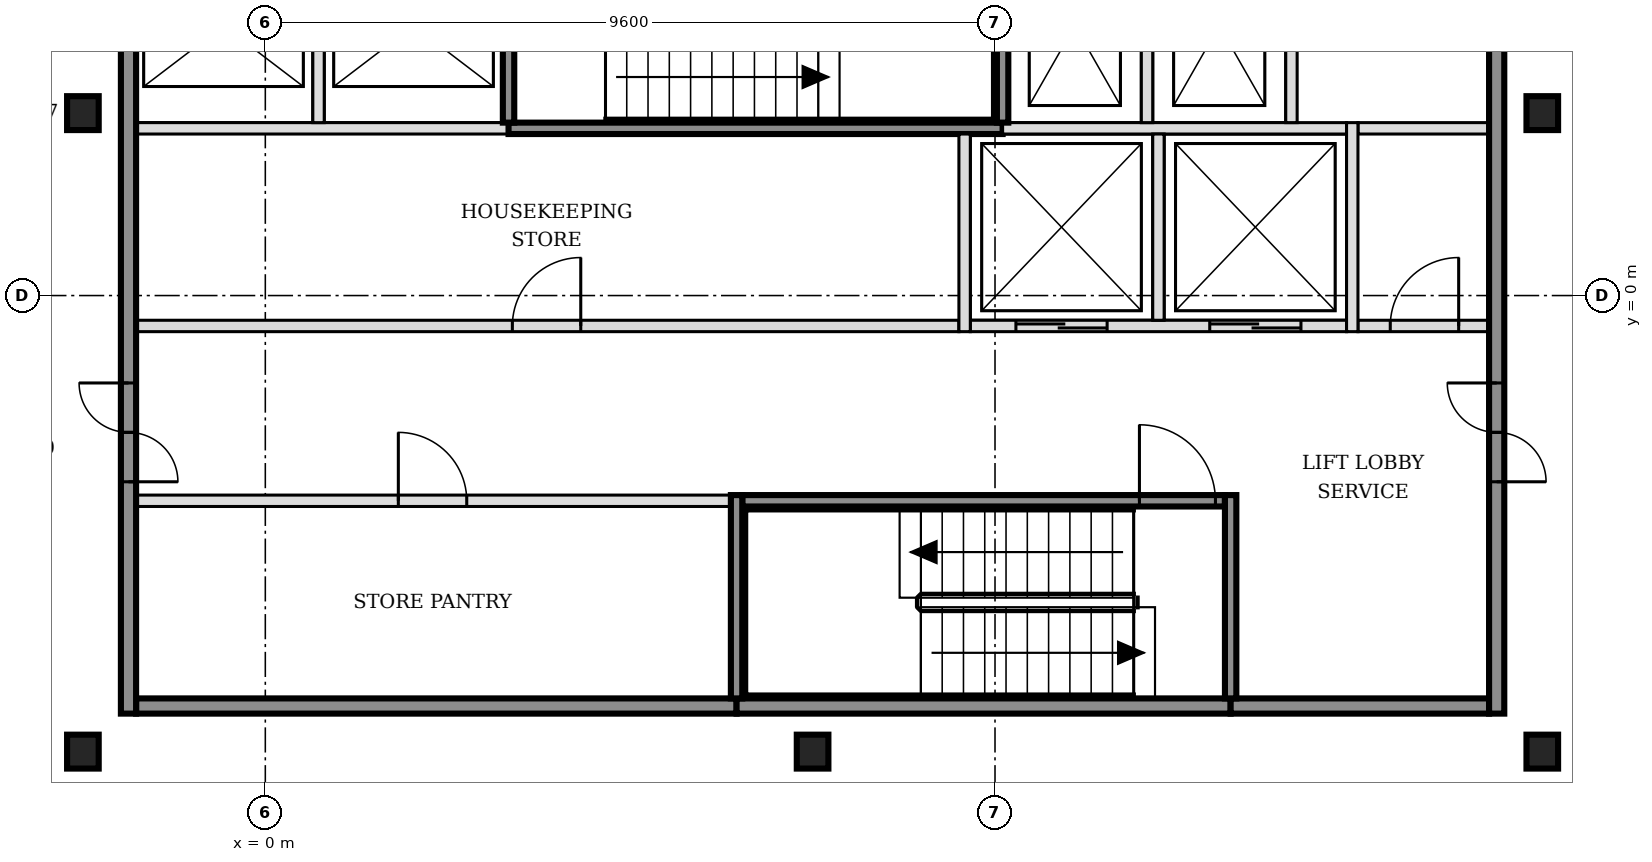
"""IFC4 building model, lengths in metres.
Left out: names, types, materials, properties, quantities, classifications, styles, units other than length and angle.
Written with IfcOpenShell. Run it as: python <this file> out.ifc"""

import sys

from ifc_helpers import new_model, si_unit, direction, frame, frame_2d, origin, origin_2d, place, context, subcontext, project, spatial, rectangle, i_section, extrude, element, fill, save


model = new_model("IFC4")
c1 = context("Model", 3, precision=1e-05, world=origin(), true_north=direction((0.0, 1.0)))
c2 = subcontext(c1, "Body", "Model", "MODEL_VIEW")
j1 = project(units=[si_unit("LENGTHUNIT", "METRE"), si_unit("PLANEANGLEUNIT", "RADIAN")], contexts=[c1])
p1 = place(None, origin())
s1 = spatial("IfcSite", under=j1, at=p1, CompositionType="ELEMENT")
p2 = place(p1, origin())
s2 = spatial("IfcBuilding", under=s1, at=p2, CompositionType="ELEMENT")
p3 = place(p2, frame((0.0, 0.0, 161.4)))
s3 = spatial("IfcBuildingStorey", under=s2, at=p3, CompositionType="ELEMENT", Elevation=161.4)
for number, where, z_axis, x_axis in (
    (1, (-2.4, -6.0, -0.15), (0.0, 0.0, 1.0), (1.0, 0.0, 0.0)),
    (2, (7.2, -6.0, -0.15), (0.0, 0.0, 1.0), (1.0, 0.0, 0.0)),
    (3, (16.8, -6.0, -0.15), (0.0, 0.0, 1.0), (1.0, 0.0, 0.0)),
    (4, (-2.4, 2.4, -0.15), (0.0, 0.0, 1.0), (1.0, 0.0, 0.0)),
    (5, (16.8, 2.4, -0.15), (0.0, 0.0, 1.0), (1.0, 0.0, 0.0)),
):
    element("IfcColumn", number, at=place(p3, frame(where, z_axis=z_axis, x_axis=x_axis)), inside=s3, PredefinedType="COLUMN", context=c2, shape_type="SweptSolid", body=[
        extrude(i_section(OverallWidth=0.416, OverallDepth=0.446, WebThickness=0.039, FlangeThickness=0.063, FilletRadius=0.015, at=origin_2d()), origin(), (0.0, 0.0, 1.0), 3.6),
    ])
p4 = place(p3, frame((-1.7, -5.4, 0.0), z_axis=(0.0, 0.0, 1.0), x_axis=(1.0, 0.0, 0.0)))
e6 = element("IfcWall", 6, at=p4, inside=s3, PredefinedType="SOLIDWALL", context=c2, shape_type="SweptSolid", body=[
    extrude(rectangle(XDim=7.9, YDim=0.2, at=frame_2d((3.95, 0.0))), origin(), (0.0, 0.0, 1.0), 3.45),
])
p5 = place(p3, frame((6.2, -5.4, 0.0), z_axis=(0.0, 0.0, 1.0), x_axis=(1.0, 0.0, 0.0)))
e7 = element("IfcWall", 7, at=p5, inside=s3, PredefinedType="SOLIDWALL", context=c2, shape_type="SweptSolid", body=[
    extrude(rectangle(XDim=6.5, YDim=0.2, at=frame_2d((3.25, 0.0))), origin(), (0.0, 0.0, 1.0), 3.45),
])
p6 = place(p3, frame((12.7, -5.4, 0.0), z_axis=(0.0, 0.0, 1.0), x_axis=(1.0, 0.0, 0.0)))
e8 = element("IfcWall", 8, at=p6, inside=s3, PredefinedType="SOLIDWALL", context=c2, shape_type="SweptSolid", body=[
    extrude(rectangle(XDim=3.4, YDim=0.2, at=frame_2d((1.7, 0.0))), origin(), (0.0, 0.0, 1.0), 3.45),
])
p7 = place(p3, frame((-1.7, -2.7, 0.0), z_axis=(0.0, 0.0, 1.0), x_axis=(1.0, 0.0, 0.0)))
e9 = element("IfcWall", 9, at=p7, inside=s3, PredefinedType="PARTITIONING", context=c2, shape_type="SweptSolid", body=[
    extrude(rectangle(XDim=7.825, YDim=0.15, at=frame_2d((3.913, 0.0))), origin(), (0.0, 0.0, 1.0), 3.45),
])
p8 = place(p7, frame((3.45, 0.0, 0.0)))
e10 = element("IfcOpeningElement", 10, at=p8, cuts=e9, PredefinedType="OPENING", context=c2, shape_type="SweptSolid", body=[
    extrude(rectangle(XDim=0.9, YDim=2.1, at=frame_2d((0.45, 1.05))), frame((0.0, 0.085, 0.0), z_axis=(0.0, -1.0, 0.0), x_axis=(1.0, 0.0, 0.0)), (0.0, 0.0, 1.0), 0.17),
])
p9 = place(p3, frame((6.275, -2.7, 0.0), z_axis=(0.0, 0.0, 1.0), x_axis=(1.0, 0.0, 0.0)))
e11 = element("IfcWall", 11, at=p9, inside=s3, PredefinedType="SOLIDWALL", context=c2, shape_type="SweptSolid", body=[
    extrude(rectangle(XDim=6.35, YDim=0.15, at=frame_2d((3.175, 0.0))), origin(), (0.0, 0.0, 1.0), 3.45),
])
p10 = place(p9, frame((5.225, 0.0, 0.0)))
e12 = element("IfcOpeningElement", 12, at=p10, cuts=e11, PredefinedType="OPENING", context=c2, shape_type="SweptSolid", body=[
    extrude(rectangle(XDim=1.0, YDim=2.1, at=frame_2d((0.5, 1.05))), frame((0.0, 0.085, 0.0), z_axis=(0.0, -1.0, 0.0), x_axis=(1.0, 0.0, 0.0)), (0.0, 0.0, 1.0), 0.17),
])
p11 = place(p3, frame((-1.7, -0.4, 0.0), z_axis=(0.0, 0.0, 1.0), x_axis=(1.0, 0.0, 0.0)))
e13 = element("IfcWall", 13, at=p11, inside=s3, PredefinedType="PARTITIONING", context=c2, shape_type="SweptSolid", body=[
    extrude(rectangle(XDim=10.825, YDim=0.15, at=frame_2d((5.413, 0.0))), origin(), (0.0, 0.0, 1.0), 3.45),
])
p12 = place(p11, frame((4.95, 0.0, 0.0)))
e14 = element("IfcOpeningElement", 14, at=p12, cuts=e13, PredefinedType="OPENING", context=c2, shape_type="SweptSolid", body=[
    extrude(rectangle(XDim=0.9, YDim=2.1, at=frame_2d((0.45, 1.05))), frame((0.0, 0.085, 0.0), z_axis=(0.0, -1.0, 0.0), x_axis=(1.0, 0.0, 0.0)), (0.0, 0.0, 1.0), 0.17),
])
p13 = place(p3, frame((9.275, -0.4, 0.0), z_axis=(0.0, 0.0, 1.0), x_axis=(1.0, 0.0, 0.0)))
e15 = element("IfcWall", 15, at=p13, inside=s3, PredefinedType="SOLIDWALL", context=c2, shape_type="SweptSolid", body=[
    extrude(rectangle(XDim=4.95, YDim=0.15, at=frame_2d((2.475, 0.0))), origin(), (0.0, 0.0, 1.0), 3.45),
])
p14 = place(p13, frame((0.6, 0.0, 0.0)))
e16 = element("IfcOpeningElement", 16, at=p14, cuts=e15, PredefinedType="OPENING", context=c2, shape_type="SweptSolid", body=[
    extrude(rectangle(XDim=1.2, YDim=2.1, at=frame_2d((0.6, 1.05))), frame((0.0, 0.085, 0.0), z_axis=(0.0, -1.0, 0.0), x_axis=(1.0, 0.0, 0.0)), (0.0, 0.0, 1.0), 0.17),
])
p15 = place(p13, frame((3.15, 0.0, 0.0)))
e17 = element("IfcOpeningElement", 17, at=p15, cuts=e15, PredefinedType="OPENING", context=c2, shape_type="SweptSolid", body=[
    extrude(rectangle(XDim=1.2, YDim=2.1, at=frame_2d((0.6, 1.05))), frame((0.0, 0.085, 0.0), z_axis=(0.0, -1.0, 0.0), x_axis=(1.0, 0.0, 0.0)), (0.0, 0.0, 1.0), 0.17),
])
p16 = place(p3, frame((14.375, -0.4, 0.0), z_axis=(0.0, 0.0, 1.0), x_axis=(1.0, 0.0, 0.0)))
e18 = element("IfcWall", 18, at=p16, inside=s3, PredefinedType="PARTITIONING", context=c2, shape_type="SweptSolid", body=[
    extrude(rectangle(XDim=1.725, YDim=0.15, at=frame_2d((0.863, 0.0))), origin(), (0.0, 0.0, 1.0), 3.45),
])
p17 = place(p16, frame((0.425, 0.0, 0.0)))
e19 = element("IfcOpeningElement", 19, at=p17, cuts=e18, PredefinedType="OPENING", context=c2, shape_type="SweptSolid", body=[
    extrude(rectangle(XDim=0.9, YDim=2.1, at=frame_2d((0.45, 1.05))), frame((0.0, 0.085, 0.0), z_axis=(0.0, -1.0, 0.0), x_axis=(1.0, 0.0, 0.0)), (0.0, 0.0, 1.0), 0.17),
])
p18 = place(p3, frame((-1.7, 2.2, 0.0), z_axis=(0.0, 0.0, 1.0), x_axis=(1.0, 0.0, 0.0)))
e20 = element("IfcWall", 20, at=p18, inside=s3, PredefinedType="SOLIDWALL", context=c2, shape_type="SweptSolid", body=[
    extrude(rectangle(XDim=4.9, YDim=0.15, at=frame_2d((2.45, 0.0))), origin(), (0.0, 0.0, 1.0), 3.45),
])
p19 = place(p3, frame((3.2, 2.2, 0.0), z_axis=(0.0, 0.0, 1.0), x_axis=(1.0, 0.0, 0.0)))
e21 = element("IfcWall", 21, at=p19, inside=s3, PredefinedType="SOLIDWALL", context=c2, shape_type="SweptSolid", body=[
    extrude(rectangle(XDim=6.5, YDim=0.15, at=frame_2d((3.25, 0.0))), origin(), (0.0, 0.0, 1.0), 3.45),
])
p20 = place(p3, frame((9.7, 2.2, 0.0), z_axis=(0.0, 0.0, 1.0), x_axis=(1.0, 0.0, 0.0)))
e22 = element("IfcWall", 22, at=p20, inside=s3, PredefinedType="SOLIDWALL", context=c2, shape_type="SweptSolid", body=[
    extrude(rectangle(XDim=4.525, YDim=0.15, at=frame_2d((2.263, 0.0))), origin(), (0.0, 0.0, 1.0), 3.45),
])
p21 = place(p3, frame((14.375, 2.2, 0.0), z_axis=(0.0, 0.0, 1.0), x_axis=(1.0, 0.0, 0.0)))
e23 = element("IfcWall", 23, at=p21, inside=s3, PredefinedType="PARTITIONING", context=c2, shape_type="SweptSolid", body=[
    extrude(rectangle(XDim=1.725, YDim=0.15, at=frame_2d((0.863, 0.0))), origin(), (0.0, 0.0, 1.0), 3.45),
])
p22 = place(p3, frame((-1.8, -5.5, 0.0), z_axis=(0.0, 0.0, 1.0), x_axis=(0.0, 1.0, 0.0)))
e24 = element("IfcWall", 24, at=p22, inside=s3, PredefinedType="SOLIDWALL", context=c2, shape_type="SweptSolid", body=[
    extrude(rectangle(XDim=15.8, YDim=0.2, at=frame_2d((7.9, 0.0))), origin(), (0.0, 0.0, 1.0), 3.45),
])
p23 = place(p22, frame((3.05, 0.0, 0.0)))
e25 = element("IfcOpeningElement", 25, at=p23, cuts=e24, PredefinedType="OPENING", context=c2, shape_type="SweptSolid", body=[
    extrude(rectangle(XDim=1.3, YDim=2.1, at=frame_2d((0.65, 1.05))), frame((0.0, 0.11, 0.0), z_axis=(0.0, -1.0, 0.0), x_axis=(1.0, 0.0, 0.0)), (0.0, 0.0, 1.0), 0.22),
])
p24 = place(p22, frame((11.45, 0.0, 0.0)))
e26 = element("IfcOpeningElement", 26, at=p24, cuts=e24, PredefinedType="OPENING", context=c2, shape_type="SweptSolid", body=[
    extrude(rectangle(XDim=1.3, YDim=2.1, at=frame_2d((0.65, 1.05))), frame((0.0, 0.11, 0.0), z_axis=(0.0, -1.0, 0.0), x_axis=(1.0, 0.0, 0.0)), (0.0, 0.0, 1.0), 0.22),
])
for number, where, z_axis, x_axis in (
    (27, (0.7, 2.275, 0.0), (0.0, 0.0, 1.0), (0.0, 1.0, 0.0)),
    (28, (3.2, 2.275, 0.0), (0.0, 0.0, 1.0), (0.0, 1.0, 0.0)),
):
    element("IfcWall", number, at=place(p3, frame(where, z_axis=z_axis, x_axis=x_axis)), inside=s3, PredefinedType="SOLIDWALL", context=c2, shape_type="SweptSolid", body=[
        extrude(rectangle(XDim=2.55, YDim=0.15, at=frame_2d((1.275, 0.0))), origin(), (0.0, 0.0, 1.0), 3.45),
    ])
p25 = place(p3, frame((6.2, -5.3, 0.0), z_axis=(0.0, 0.0, 1.0), x_axis=(0.0, 1.0, 0.0)))
e29 = element("IfcWall", 29, at=p25, inside=s3, PredefinedType="SOLIDWALL", context=c2, shape_type="SweptSolid", body=[
    extrude(rectangle(XDim=2.675, YDim=0.15, at=frame_2d((1.337, 0.0))), origin(), (0.0, 0.0, 1.0), 3.45),
])
p26 = place(p3, frame((9.2, -0.475, 0.0), z_axis=(0.0, 0.0, 1.0), x_axis=(0.0, 1.0, 0.0)))
e30 = element("IfcWall", 30, at=p26, inside=s3, PredefinedType="SOLIDWALL", context=c2, shape_type="SweptSolid", body=[
    extrude(rectangle(XDim=2.6, YDim=0.15, at=frame_2d((1.3, 0.0))), origin(), (0.0, 0.0, 1.0), 3.45),
])
for number, where, z_axis, x_axis in (
    (31, (9.7, 2.275, 0.0), (0.0, 0.0, 1.0), (0.0, 1.0, 0.0)),
    (32, (11.6, 2.275, 0.0), (0.0, 0.0, 1.0), (0.0, 1.0, 0.0)),
):
    element("IfcWall", number, at=place(p3, frame(where, z_axis=z_axis, x_axis=x_axis)), inside=s3, PredefinedType="SOLIDWALL", context=c2, shape_type="SweptSolid", body=[
        extrude(rectangle(XDim=2.55, YDim=0.15, at=frame_2d((1.275, 0.0))), origin(), (0.0, 0.0, 1.0), 3.45),
    ])
p27 = place(p3, frame((11.75, -0.325, 0.0), z_axis=(0.0, 0.0, 1.0), x_axis=(0.0, 1.0, 0.0)))
e33 = element("IfcWall", 33, at=p27, inside=s3, PredefinedType="SOLIDWALL", context=c2, shape_type="SweptSolid", body=[
    extrude(rectangle(XDim=2.45, YDim=0.15, at=frame_2d((1.225, 0.0))), origin(), (0.0, 0.0, 1.0), 3.45),
])
p28 = place(p3, frame((12.7, -5.3, 0.0), z_axis=(0.0, 0.0, 1.0), x_axis=(0.0, 1.0, 0.0)))
e34 = element("IfcWall", 34, at=p28, inside=s3, PredefinedType="SOLIDWALL", context=c2, shape_type="SweptSolid", body=[
    extrude(rectangle(XDim=2.675, YDim=0.15, at=frame_2d((1.337, 0.0))), origin(), (0.0, 0.0, 1.0), 3.45),
])
p29 = place(p3, frame((13.5, 2.275, 0.0), z_axis=(0.0, 0.0, 1.0), x_axis=(0.0, 1.0, 0.0)))
e35 = element("IfcWall", 35, at=p29, inside=s3, PredefinedType="SOLIDWALL", context=c2, shape_type="SweptSolid", body=[
    extrude(rectangle(XDim=2.55, YDim=0.15, at=frame_2d((1.275, 0.0))), origin(), (0.0, 0.0, 1.0), 3.45),
])
p30 = place(p3, frame((14.3, -0.475, 0.0), z_axis=(0.0, 0.0, 1.0), x_axis=(0.0, 1.0, 0.0)))
e36 = element("IfcWall", 36, at=p30, inside=s3, PredefinedType="SOLIDWALL", context=c2, shape_type="SweptSolid", body=[
    extrude(rectangle(XDim=2.75, YDim=0.15, at=frame_2d((1.375, 0.0))), origin(), (0.0, 0.0, 1.0), 3.45),
])
p31 = place(p3, frame((16.2, -5.5, 0.0), z_axis=(0.0, 0.0, 1.0), x_axis=(0.0, 1.0, 0.0)))
e37 = element("IfcWall", 37, at=p31, inside=s3, PredefinedType="SOLIDWALL", context=c2, shape_type="SweptSolid", body=[
    extrude(rectangle(XDim=15.8, YDim=0.2, at=frame_2d((7.9, 0.0))), origin(), (0.0, 0.0, 1.0), 3.45),
])
p32 = place(p31, frame((3.05, 0.0, 0.0)))
e38 = element("IfcOpeningElement", 38, at=p32, cuts=e37, PredefinedType="OPENING", context=c2, shape_type="SweptSolid", body=[
    extrude(rectangle(XDim=1.3, YDim=2.1, at=frame_2d((0.65, 1.05))), frame((0.0, 0.11, 0.0), z_axis=(0.0, -1.0, 0.0), x_axis=(1.0, 0.0, 0.0)), (0.0, 0.0, 1.0), 0.22),
])
p33 = place(p31, frame((11.45, 0.0, 0.0)))
e39 = element("IfcOpeningElement", 39, at=p33, cuts=e37, PredefinedType="OPENING", context=c2, shape_type="SweptSolid", body=[
    extrude(rectangle(XDim=1.3, YDim=2.1, at=frame_2d((0.65, 1.05))), frame((0.0, 0.11, 0.0), z_axis=(0.0, -1.0, 0.0), x_axis=(1.0, 0.0, 0.0)), (0.0, 0.0, 1.0), 0.22),
])
p34 = place(p14, origin())
e40 = element("IfcDoor", 40, at=p34, inside=s3, OperationType="DOUBLE_DOOR_SLIDING", PredefinedType="DOOR", context=c2, shape_type="SweptSolid", body=[
    extrude(rectangle(XDim=1.2, YDim=2.1, at=frame_2d((0.6, 1.05))), frame((0.0, 0.025, 0.0), z_axis=(0.0, -1.0, 0.0), x_axis=(1.0, 0.0, 0.0)), (0.0, 0.0, 1.0), 0.05),
])
fill(e16, e40)
p35 = place(p15, origin())
e41 = element("IfcDoor", 41, at=p35, inside=s3, OperationType="DOUBLE_DOOR_SLIDING", PredefinedType="DOOR", context=c2, shape_type="SweptSolid", body=[
    extrude(rectangle(XDim=1.2, YDim=2.1, at=frame_2d((0.6, 1.05))), frame((0.0, 0.025, 0.0), z_axis=(0.0, -1.0, 0.0), x_axis=(1.0, 0.0, 0.0)), (0.0, 0.0, 1.0), 0.05),
])
fill(e17, e41)
p36 = place(p10, origin())
e42 = element("IfcDoor", 42, at=p36, inside=s3, OperationType="SINGLE_SWING_LEFT", PredefinedType="DOOR", context=c2, shape_type="SweptSolid", body=[
    extrude(rectangle(XDim=1.0, YDim=2.1, at=frame_2d((0.5, 1.05))), frame((0.0, 0.025, 0.0), z_axis=(0.0, -1.0, 0.0), x_axis=(1.0, 0.0, 0.0)), (0.0, 0.0, 1.0), 0.05),
])
fill(e12, e42)
p37 = place(p23, origin())
e43 = element("IfcDoor", 43, at=p37, inside=s3, OperationType="DOUBLE_DOOR_SINGLE_SWING", PredefinedType="DOOR", context=c2, shape_type="SweptSolid", body=[
    extrude(rectangle(XDim=1.3, YDim=2.1, at=frame_2d((0.65, 1.05))), frame((0.0, 0.025, 0.0), z_axis=(0.0, -1.0, 0.0), x_axis=(1.0, 0.0, 0.0)), (0.0, 0.0, 1.0), 0.05),
])
fill(e25, e43)
p38 = place(p32, origin())
e44 = element("IfcDoor", 44, at=p38, inside=s3, OperationType="DOUBLE_DOOR_SINGLE_SWING", PredefinedType="DOOR", context=c2, shape_type="SweptSolid", body=[
    extrude(rectangle(XDim=1.3, YDim=2.1, at=frame_2d((0.65, 1.05))), frame((0.0, 0.025, 0.0), z_axis=(0.0, -1.0, 0.0), x_axis=(1.0, 0.0, 0.0)), (0.0, 0.0, 1.0), 0.05),
])
fill(e38, e44)
p39 = place(p17, origin())
e45 = element("IfcDoor", 45, at=p39, inside=s3, OperationType="SINGLE_SWING_RIGHT", PredefinedType="DOOR", context=c2, shape_type="SweptSolid", body=[
    extrude(rectangle(XDim=0.9, YDim=2.1, at=frame_2d((0.45, 1.05))), frame((0.0, 0.025, 0.0), z_axis=(0.0, -1.0, 0.0), x_axis=(1.0, 0.0, 0.0)), (0.0, 0.0, 1.0), 0.05),
])
fill(e19, e45)
p40 = place(p8, origin())
e46 = element("IfcDoor", 46, at=p40, inside=s3, OperationType="SINGLE_SWING_LEFT", PredefinedType="DOOR", context=c2, shape_type="SweptSolid", body=[
    extrude(rectangle(XDim=0.9, YDim=2.1, at=frame_2d((0.45, 1.05))), frame((0.0, 0.025, 0.0), z_axis=(0.0, -1.0, 0.0), x_axis=(1.0, 0.0, 0.0)), (0.0, 0.0, 1.0), 0.05),
])
fill(e10, e46)
p41 = place(p12, origin())
e47 = element("IfcDoor", 47, at=p41, inside=s3, OperationType="SINGLE_SWING_RIGHT", PredefinedType="DOOR", context=c2, shape_type="SweptSolid", body=[
    extrude(rectangle(XDim=0.9, YDim=2.1, at=frame_2d((0.45, 1.05))), frame((0.0, 0.025, 0.0), z_axis=(0.0, -1.0, 0.0), x_axis=(1.0, 0.0, 0.0)), (0.0, 0.0, 1.0), 0.05),
])
fill(e14, e47)
save(model, sys.argv[1])
